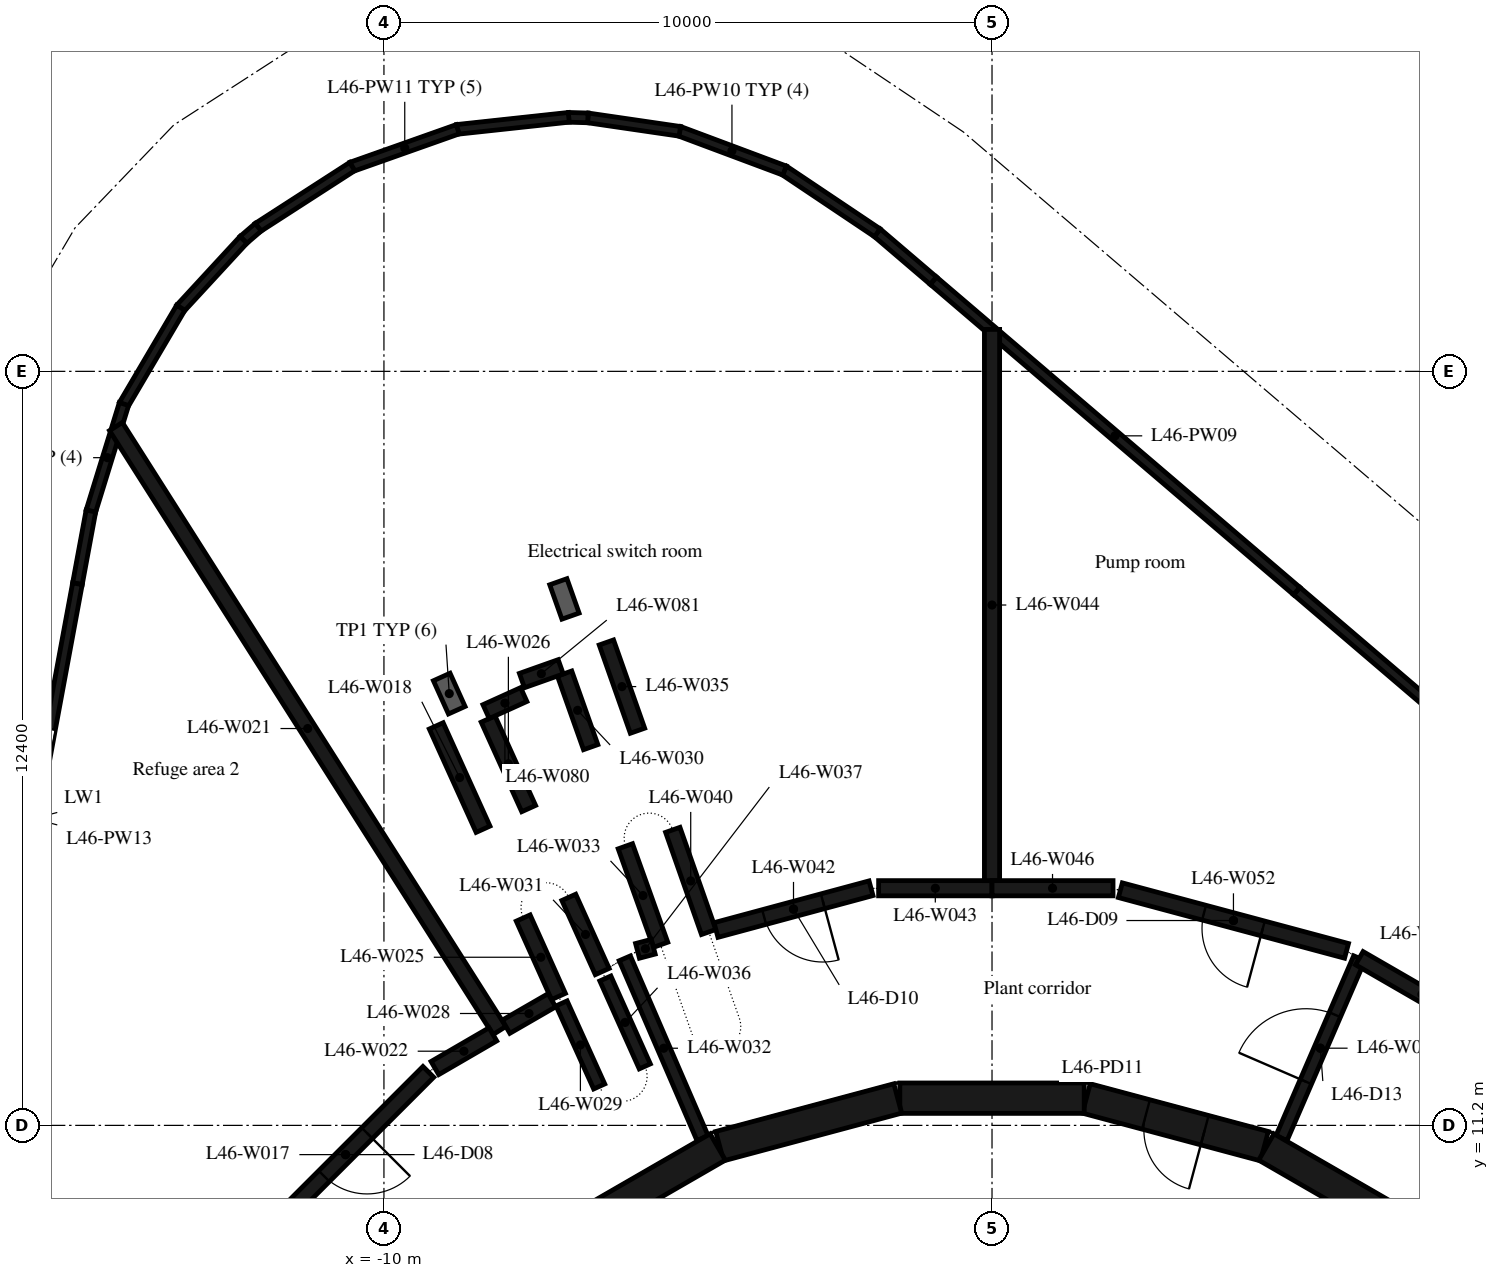
"""IFC4 building model, lengths in metres.
Left out: names, types, materials, properties, quantities, classifications, styles, units other than length and angle.
Written with IfcOpenShell. Run it as: python <this file> out.ifc"""

import sys

from ifc_helpers import new_model, si_unit, direction, frame, frame_2d, origin, place, context, subcontext, project, spatial, rectangle, extrude, element, fill, save


model = new_model("IFC4")
c1 = context("Model", 3, precision=1e-05, world=origin(), true_north=direction((0.0, 1.0)))
c2 = subcontext(c1, "Body", "Model", "MODEL_VIEW")
j1 = project(units=[si_unit("LENGTHUNIT", "METRE"), si_unit("PLANEANGLEUNIT", "RADIAN")], contexts=[c1])
p1 = place(None, origin())
s1 = spatial("IfcSite", under=j1, at=p1, CompositionType="ELEMENT")
p2 = place(p1, origin())
s2 = spatial("IfcBuilding", under=s1, at=p2, CompositionType="ELEMENT")
p3 = place(p2, frame((0.0, 0.0, 183.2)))
s3 = spatial("IfcBuildingStorey", under=s2, at=p3, CompositionType="ELEMENT", Elevation=183.2)
for number, where, z_axis, x_axis in (
    (1, (10.988, 14.883, 0.0), (0.0, 0.0, 1.0), (-0.76, 0.649, 0.0)),
    (2, (5.011, 19.987, 0.0), (0.0, 0.0, 1.0), (-0.76, 0.649, 0.0)),
):
    element("IfcWall", number, at=place(p3, frame(where, z_axis=z_axis, x_axis=x_axis)), inside=s3, PredefinedType="STANDARD", context=c2, shape_type="SweptSolid", body=[
        extrude(rectangle(XDim=7.86, YDim=0.16, at=frame_2d((3.93, 0.0))), origin(), (0.0, 0.0, 1.0), 4.75),
    ])
p4 = place(p3, frame((-0.966, 25.092, 0.0), z_axis=(0.0, 0.0, 1.0), x_axis=(-0.760346823152, 0.649517288856, 0.0)))
e3 = element("IfcWall", 3, at=p4, inside=s3, PredefinedType="STANDARD", context=c2, shape_type="SweptSolid", body=[
    extrude(rectangle(XDim=1.216, YDim=0.16, at=frame_2d((0.608, 0.0))), origin(), (0.0, 0.0, 1.0), 4.75),
])
p5 = place(p3, frame((-1.886, 25.879, 0.0), z_axis=(0.0, 0.0, 1.0), x_axis=(-0.830623160585, 0.556834953195, 0.0)))
e4 = element("IfcWall", 4, at=p5, inside=s3, PredefinedType="STANDARD", context=c2, shape_type="SweptSolid", body=[
    extrude(rectangle(XDim=1.846, YDim=0.16, at=frame_2d((0.923, 0.0))), origin(), (0.0, 0.0, 1.0), 4.75),
])
p6 = place(p3, frame((-3.411, 26.902, 0.0), z_axis=(0.0, 0.0, 1.0), x_axis=(-0.936665358307, 0.350225650899, 0.0)))
e5 = element("IfcWall", 5, at=p6, inside=s3, PredefinedType="STANDARD", context=c2, shape_type="SweptSolid", body=[
    extrude(rectangle(XDim=1.848, YDim=0.16, at=frame_2d((0.924, 0.0))), origin(), (0.0, 0.0, 1.0), 4.75),
])
p7 = place(p3, frame((-5.134, 27.547, 0.0), z_axis=(0.0, 0.0, 1.0), x_axis=(-0.989464414306, 0.144776285427, 0.0)))
e6 = element("IfcWall", 6, at=p7, inside=s3, PredefinedType="STANDARD", context=c2, shape_type="SweptSolid", body=[
    extrude(rectangle(XDim=1.528, YDim=0.16, at=frame_2d((0.764, 0.0))), origin(), (0.0, 0.0, 1.0), 4.75),
])
p8 = place(p3, frame((-6.646, 27.768, 0.0), z_axis=(0.0, 0.0, 1.0), x_axis=(-0.999601368957, 0.028233015764, 0.0)))
e7 = element("IfcWall", 7, at=p8, inside=s3, PredefinedType="STANDARD", context=c2, shape_type="SweptSolid", body=[
    extrude(rectangle(XDim=0.32, YDim=0.16, at=frame_2d((0.16, 0.0))), origin(), (0.0, 0.0, 1.0), 4.75),
])
p9 = place(p3, frame((-6.96, 27.778, 0.0), z_axis=(0.0, 0.0, 1.0), x_axis=(-0.994203609692, -0.107513638558, 0.0)))
e8 = element("IfcWall", 8, at=p9, inside=s3, PredefinedType="STANDARD", context=c2, shape_type="SweptSolid", body=[
    extrude(rectangle(XDim=1.846, YDim=0.16, at=frame_2d((0.923, 0.0))), origin(), (0.0, 0.0, 1.0), 4.75),
])
p10 = place(p3, frame((-8.787, 27.581, 0.0), z_axis=(0.0, 0.0, 1.0), x_axis=(-0.942641080988, -0.333808017329, 0.0)))
e9 = element("IfcWall", 9, at=p10, inside=s3, PredefinedType="STANDARD", context=c2, shape_type="SweptSolid", body=[
    extrude(rectangle(XDim=1.848, YDim=0.16, at=frame_2d((0.924, 0.0))), origin(), (0.0, 0.0, 1.0), 4.75),
])
p11 = place(p3, frame((-10.521, 26.969, 0.0), z_axis=(0.0, 0.0, 1.0), x_axis=(-0.840236412117, -0.542220224404, 0.0)))
e10 = element("IfcWall", 10, at=p11, inside=s3, PredefinedType="STANDARD", context=c2, shape_type="SweptSolid", body=[
    extrude(rectangle(XDim=1.846, YDim=0.16, at=frame_2d((0.923, 0.0))), origin(), (0.0, 0.0, 1.0), 4.75),
])
p12 = place(p3, frame((-12.068, 25.971, 0.0), z_axis=(0.0, 0.0, 1.0), x_axis=(-0.758501989584, -0.651670723446, 0.0)))
e11 = element("IfcWall", 11, at=p12, inside=s3, PredefinedType="STANDARD", context=c2, shape_type="SweptSolid", body=[
    extrude(rectangle(XDim=0.32, YDim=0.16, at=frame_2d((0.16, 0.0))), origin(), (0.0, 0.0, 1.0), 4.75),
])
p13 = place(p3, frame((-12.31, 25.762, 0.0), z_axis=(0.0, 0.0, 1.0), x_axis=(-0.678007946149, -0.735054572776, 0.0)))
e12 = element("IfcWall", 12, at=p13, inside=s3, PredefinedType="STANDARD", context=c2, shape_type="SweptSolid", body=[
    extrude(rectangle(XDim=1.528, YDim=0.16, at=frame_2d((0.764, 0.0))), origin(), (0.0, 0.0, 1.0), 4.75),
])
p14 = place(p3, frame((-13.341, 24.646, 0.0), z_axis=(0.0, 0.0, 1.0), x_axis=(-0.50746464076, -0.861672581889, 0.0)))
e13 = element("IfcWall", 13, at=p14, inside=s3, PredefinedType="STANDARD", context=c2, shape_type="SweptSolid", body=[
    extrude(rectangle(XDim=1.848, YDim=0.16, at=frame_2d((0.924, 0.0))), origin(), (0.0, 0.0, 1.0), 4.75),
])
p15 = place(p3, frame((-14.275, 23.062, 0.0), z_axis=(0.0, 0.0, 1.0), x_axis=(-0.295200909257, -0.955435200929, 0.0)))
e14 = element("IfcWall", 14, at=p15, inside=s3, PredefinedType="STANDARD", context=c2, shape_type="SweptSolid", body=[
    extrude(rectangle(XDim=1.846, YDim=0.16, at=frame_2d((0.923, 0.0))), origin(), (0.0, 0.0, 1.0), 4.75),
])
p16 = place(p3, frame((-14.819, 21.303, 0.0), z_axis=(0.0, 0.0, 1.0), x_axis=(-0.182153983932, -0.983270016902, 0.0)))
e15 = element("IfcWall", 15, at=p16, inside=s3, PredefinedType="STANDARD", context=c2, shape_type="SweptSolid", body=[
    extrude(rectangle(XDim=1.216, YDim=0.16, at=frame_2d((0.608, 0.0))), origin(), (0.0, 0.0, 1.0), 4.75),
])
p17 = place(p3, frame((-15.041, 20.108, 0.0), z_axis=(0.0, 0.0, 1.0), x_axis=(-0.182238304251, -0.983254392547, 0.0)))
e16 = element("IfcWall", 16, at=p17, inside=s3, PredefinedType="STANDARD", context=c2, shape_type="SweptSolid", body=[
    extrude(rectangle(XDim=7.86, YDim=0.16, at=frame_2d((3.93, 0.0))), origin(), (0.0, 0.0, 1.0), 4.75),
])
p18 = place(p17, frame((2.43, 0.0, 1.0)))
e17 = element("IfcOpeningElement", 17, at=p18, cuts=e16, PredefinedType="OPENING", context=c2, shape_type="SweptSolid", body=[
    extrude(rectangle(XDim=3.0, YDim=2.2, at=frame_2d((1.5, 1.1))), frame((0.0, 0.09, 0.0), z_axis=(0.0, -1.0, 0.0), x_axis=(1.0, 0.0, 0.0)), (0.0, 0.0, 1.0), 0.18),
])
p19 = place(p3, frame((7.137, 9.329, 0.0), z_axis=(0.0, 0.0, 1.0), x_axis=(-0.865975092491, 0.500087131594, 0.0)))
e18 = element("IfcWall", 18, at=p19, inside=s3, PredefinedType="SHEAR", context=c2, shape_type="SweptSolid", body=[
    extrude(rectangle(XDim=3.033, YDim=0.5, at=frame_2d((1.516, 0.0))), origin(), (0.0, 0.0, 1.0), 4.75),
])
p20 = place(p3, frame((4.479, 10.858, 0.0), z_axis=(0.0, 0.0, 1.0), x_axis=(-0.965948410781, 0.258734743916, 0.0)))
e19 = element("IfcWall", 19, at=p20, inside=s3, PredefinedType="SHEAR", context=c2, shape_type="SweptSolid", body=[
    extrude(rectangle(XDim=3.033, YDim=0.5, at=frame_2d((1.516, 0.0))), origin(), (0.0, 0.0, 1.0), 4.75),
])
p21 = place(p20, frame((1.016, 0.0, 0.0)))
e20 = element("IfcOpeningElement", 20, at=p21, cuts=e19, PredefinedType="OPENING", context=c2, shape_type="SweptSolid", body=[
    extrude(rectangle(XDim=1.0, YDim=2.4, at=frame_2d((0.5, 1.2))), frame((0.0, 0.26, 0.0), z_axis=(0.0, -1.0, 0.0), x_axis=(1.0, 0.0, 0.0)), (0.0, 0.0, 1.0), 0.52),
])
for number, where, z_axis, x_axis in (
    (21, (1.516, 11.647, 0.0), (0.0, 0.0, 1.0), (-1.0, 0.0, 0.0)),
    (22, (-1.55, 11.643, 0.0), (0.0, 0.0, 1.0), (-0.966, -0.259, 0.0)),
    (23, (-4.51, 10.845, 0.0), (0.0, 0.0, 1.0), (-0.866, -0.5, 0.0)),
):
    element("IfcWall", number, at=place(p3, frame(where, z_axis=z_axis, x_axis=x_axis)), inside=s3, PredefinedType="SHEAR", context=c2, shape_type="SweptSolid", body=[
        extrude(rectangle(XDim=3.033, YDim=0.5, at=frame_2d((1.516, 0.0))), origin(), (0.0, 0.0, 1.0), 4.75),
    ])
p22 = place(p3, frame((-9.27, 12.08, 0.0), z_axis=(0.0, 0.0, 1.0), x_axis=(-0.707106781187, -0.707106781187, 0.0)))
e24 = element("IfcWall", 24, at=p22, inside=s3, PredefinedType="PARTITIONING", context=c2, shape_type="SweptSolid", body=[
    extrude(rectangle(XDim=3.849, YDim=0.25, at=frame_2d((1.925, 0.0))), origin(), (0.0, 0.0, 1.0), 4.75),
])
p23 = place(p22, frame((1.425, 0.0, 0.0)))
e25 = element("IfcOpeningElement", 25, at=p23, cuts=e24, PredefinedType="OPENING", context=c2, shape_type="SweptSolid", body=[
    extrude(rectangle(XDim=1.0, YDim=2.1, at=frame_2d((0.5, 1.05))), frame((0.0, 0.135, 0.0), z_axis=(0.0, -1.0, 0.0), x_axis=(1.0, 0.0, 0.0)), (0.0, 0.0, 1.0), 0.27),
])
p24 = place(p3, frame((-9.14, 17.77, 0.0), z_axis=(0.0, 0.0, 1.0), x_axis=(0.412501408044, -0.910956962958, 0.0)))
e26 = element("IfcWall", 26, at=p24, inside=s3, PredefinedType="PARTITIONING", context=c2, shape_type="SweptSolid", body=[
    extrude(rectangle(XDim=1.866, YDim=0.25, at=frame_2d((0.933, 0.0))), origin(), (0.0, 0.0, 1.0), 4.75),
])
p25 = place(p3, frame((-8.1, 12.76, 0.0), z_axis=(0.0, 0.0, 1.0), x_axis=(-0.536060247706, 0.844179726616, 0.0)))
e27 = element("IfcWall", 27, at=p25, inside=s3, PredefinedType="PARTITIONING", context=c2, shape_type="SweptSolid", body=[
    extrude(rectangle(XDim=11.766, YDim=0.25, at=frame_2d((5.883, 0.0))), origin(), (0.0, 0.0, 1.0), 4.75),
])
p26 = place(p3, frame((-8.208, 12.697, 0.0), z_axis=(0.0, 0.0, 1.0), x_axis=(-0.86455637663, -0.502535841138, 0.0)))
e28 = element("IfcWall", 28, at=p26, inside=s3, PredefinedType="PARTITIONING", context=c2, shape_type="SweptSolid", body=[
    extrude(rectangle(XDim=1.103, YDim=0.25, at=frame_2d((0.552, 0.0))), origin(), (0.0, 0.0, 1.0), 4.75),
])
p27 = place(p3, frame((-7.71, 14.61, 0.0), z_axis=(0.0, 0.0, 1.0), x_axis=(0.410106293635, -0.912037733825, 0.0)))
e29 = element("IfcWall", 29, at=p27, inside=s3, PredefinedType="PARTITIONING", context=c2, shape_type="SweptSolid", body=[
    extrude(rectangle(XDim=1.415, YDim=0.25, at=frame_2d((0.707, 0.0))), origin(), (0.0, 0.0, 1.0), 4.75),
])
p28 = place(p3, frame((-7.62, 16.41, 0.0), z_axis=(0.0, 0.0, 1.0), x_axis=(-0.412505188341, 0.910955251147, 0.0)))
e30 = element("IfcWall", 30, at=p28, inside=s3, PredefinedType="PARTITIONING", context=c2, shape_type="SweptSolid", body=[
    extrude(rectangle(XDim=1.616, YDim=0.25, at=frame_2d((0.808, 0.0))), origin(), (0.0, 0.0, 1.0), 4.75),
])
p29 = place(p3, frame((-7.238, 13.258, 0.0), z_axis=(0.0, 0.0, 1.0), x_axis=(-0.865989304205, -0.500062521093, 0.0)))
e31 = element("IfcWall", 31, at=p29, inside=s3, PredefinedType="PARTITIONING", context=c2, shape_type="SweptSolid", body=[
    extrude(rectangle(XDim=0.87, YDim=0.25, at=frame_2d((0.435, 0.0))), origin(), (0.0, 0.0, 1.0), 4.75),
])
p30 = place(p3, frame((-7.078, 13.206, 0.0), z_axis=(0.0, 0.0, 1.0), x_axis=(0.412428521681, -0.910989963997, 0.0)))
e32 = element("IfcWall", 32, at=p30, inside=s3, PredefinedType="PARTITIONING", context=c2, shape_type="SweptSolid", body=[
    extrude(rectangle(XDim=1.5, YDim=0.2, at=frame_2d((0.75, 0.0))), origin(), (0.0, 0.0, 1.0), 4.75),
])
p31 = place(p3, frame((-7.029, 18.631, 0.0), z_axis=(0.0, 0.0, 1.0), x_axis=(0.333903428613, -0.942607288514, 0.0)))
e33 = element("IfcWall", 33, at=p31, inside=s3, PredefinedType="PARTITIONING", context=c2, shape_type="SweptSolid", body=[
    extrude(rectangle(XDim=1.285, YDim=0.25, at=frame_2d((0.642, 0.0))), origin(), (0.0, 0.0, 1.0), 4.75),
])
p32 = place(p3, frame((-6.41, 13.73, 0.0), z_axis=(0.0, 0.0, 1.0), x_axis=(-0.411024519378, 0.911624289096, 0.0)))
e34 = element("IfcWall", 34, at=p32, inside=s3, PredefinedType="PARTITIONING", context=c2, shape_type="SweptSolid", body=[
    extrude(rectangle(XDim=1.338, YDim=0.25, at=frame_2d((0.669, 0.0))), origin(), (0.0, 0.0, 1.0), 4.75),
])
p33 = place(p3, frame((-6.039, 13.948, 0.0), z_axis=(0.0, 0.0, 1.0), x_axis=(0.396880096663, -0.917870464103, 0.0)))
e35 = element("IfcWall", 35, at=p33, inside=s3, PredefinedType="PARTITIONING", context=c2, shape_type="SweptSolid", body=[
    extrude(rectangle(XDim=3.222, YDim=0.2, at=frame_2d((1.611, 0.0))), origin(), (0.0, 0.0, 1.0), 4.75),
])
p34 = place(p3, frame((-6.03, 15.79, 0.0), z_axis=(0.0, 0.0, 1.0), x_axis=(0.337091235246, -0.941471985308, 0.0)))
e36 = element("IfcWall", 36, at=p34, inside=s3, PredefinedType="PARTITIONING", context=c2, shape_type="SweptSolid", body=[
    extrude(rectangle(XDim=1.721, YDim=0.25, at=frame_2d((0.86, 0.0))), origin(), (0.0, 0.0, 1.0), 4.75),
])
p35 = place(p3, frame((-5.83, 17.69, 0.0), z_axis=(0.0, 0.0, 1.0), x_axis=(-0.332455036473, 0.94311910633, 0.0)))
e37 = element("IfcWall", 37, at=p35, inside=s3, PredefinedType="PARTITIONING", context=c2, shape_type="SweptSolid", body=[
    extrude(rectangle(XDim=1.539, YDim=0.25, at=frame_2d((0.77, 0.0))), origin(), (0.0, 0.0, 1.0), 4.75),
])
p36 = place(p3, frame((-5.71, 12.17, 0.0), z_axis=(0.0, 0.0, 1.0), x_axis=(-0.40942296047, 0.912344693326, 0.0)))
e38 = element("IfcWall", 38, at=p36, inside=s3, PredefinedType="PARTITIONING", context=c2, shape_type="SweptSolid", body=[
    extrude(rectangle(XDim=1.585, YDim=0.2, at=frame_2d((0.792, 0.0))), origin(), (0.0, 0.0, 1.0), 4.75),
])
p37 = place(p3, frame((-5.571, 14.138, 0.0), z_axis=(0.0, 0.0, 1.0), x_axis=(-0.967180624685, -0.254089825129, 0.0)))
e39 = element("IfcWall", 39, at=p37, inside=s3, PredefinedType="PARTITIONING", context=c2, shape_type="SweptSolid", body=[
    extrude(rectangle(XDim=0.268, YDim=0.25, at=frame_2d((0.134, 0.0))), origin(), (0.0, 0.0, 1.0), 4.75),
])
p38 = place(p3, frame((-4.66, 14.38, 0.0), z_axis=(0.0, 0.0, 1.0), x_axis=(-0.331363959676, 0.943503008065, 0.0)))
e40 = element("IfcWall", 40, at=p38, inside=s3, PredefinedType="PARTITIONING", context=c2, shape_type="SweptSolid", body=[
    extrude(rectangle(XDim=1.781, YDim=0.25, at=frame_2d((0.89, 0.0))), origin(), (0.0, 0.0, 1.0), 4.75),
])
p39 = place(p3, frame((-1.99, 15.1, 0.0), z_axis=(0.0, 0.0, 1.0), x_axis=(-0.965506757826, -0.260377995598, 0.0)))
e41 = element("IfcWall", 41, at=p39, inside=s3, PredefinedType="PARTITIONING", context=c2, shape_type="SweptSolid", body=[
    extrude(rectangle(XDim=2.64, YDim=0.25, at=frame_2d((1.32, 0.0))), origin(), (0.0, 0.0, 1.0), 4.75),
])
p40 = place(p39, frame((0.82, 0.0, 0.0)))
e42 = element("IfcOpeningElement", 42, at=p40, cuts=e41, PredefinedType="OPENING", context=c2, shape_type="SweptSolid", body=[
    extrude(rectangle(XDim=1.0, YDim=2.1, at=frame_2d((0.5, 1.05))), frame((0.0, 0.135, 0.0), z_axis=(0.0, -1.0, 0.0), x_axis=(1.0, 0.0, 0.0)), (0.0, 0.0, 1.0), 0.27),
])
p41 = place(p3, frame((0.0, 15.1, 0.0), z_axis=(0.0, 0.0, 1.0), x_axis=(-1.0, 0.0, 0.0)))
e43 = element("IfcWall", 43, at=p41, inside=s3, PredefinedType="PARTITIONING", context=c2, shape_type="SweptSolid", body=[
    extrude(rectangle(XDim=1.865, YDim=0.25, at=frame_2d((0.933, 0.0))), origin(), (0.0, 0.0, 1.0), 4.75),
])
p42 = place(p3, frame((0.0, 15.225, 0.0), z_axis=(0.0, 0.0, 1.0), x_axis=(0.0, 1.0, 0.0)))
e44 = element("IfcWall", 44, at=p42, inside=s3, PredefinedType="PARTITIONING", context=c2, shape_type="SweptSolid", body=[
    extrude(rectangle(XDim=9.065, YDim=0.25, at=frame_2d((4.532, 0.0))), origin(), (0.0, 0.0, 1.0), 4.75),
])
p43 = place(p3, frame((1.99, 15.1, 0.0), z_axis=(0.0, 0.0, 1.0), x_axis=(-1.0, 0.0, 0.0)))
e45 = element("IfcWall", 45, at=p43, inside=s3, PredefinedType="PARTITIONING", context=c2, shape_type="SweptSolid", body=[
    extrude(rectangle(XDim=1.99, YDim=0.25, at=frame_2d((0.995, 0.0))), origin(), (0.0, 0.0, 1.0), 4.75),
])
p44 = place(p3, frame((4.76, 10.99, 0.0), z_axis=(0.0, 0.0, 1.0), x_axis=(0.396905977672, 0.917859272922, 0.0)))
e46 = element("IfcWall", 46, at=p44, inside=s3, PredefinedType="PARTITIONING", context=c2, shape_type="SweptSolid", body=[
    extrude(rectangle(XDim=3.224, YDim=0.2, at=frame_2d((1.612, 0.0))), origin(), (0.0, 0.0, 1.0), 4.75),
])
p45 = place(p44, frame((1.012, 0.0, 0.0)))
e47 = element("IfcOpeningElement", 47, at=p45, cuts=e46, PredefinedType="OPENING", context=c2, shape_type="SweptSolid", body=[
    extrude(rectangle(XDim=1.2, YDim=2.1, at=frame_2d((0.6, 1.05))), frame((0.0, 0.11, 0.0), z_axis=(0.0, -1.0, 0.0), x_axis=(1.0, 0.0, 0.0)), (0.0, 0.0, 1.0), 0.22),
])
p46 = place(p3, frame((5.83, 14.07, 0.0), z_axis=(0.0, 0.0, 1.0), x_axis=(-0.965861411942, 0.259059323171, 0.0)))
e48 = element("IfcWall", 48, at=p46, inside=s3, PredefinedType="PARTITIONING", context=c2, shape_type="SweptSolid", body=[
    extrude(rectangle(XDim=3.851, YDim=0.25, at=frame_2d((1.925, 0.0))), origin(), (0.0, 0.0, 1.0), 4.75),
])
p47 = place(p46, frame((1.425, 0.0, 0.0)))
e49 = element("IfcOpeningElement", 49, at=p47, cuts=e48, PredefinedType="OPENING", context=c2, shape_type="SweptSolid", body=[
    extrude(rectangle(XDim=1.0, YDim=2.1, at=frame_2d((0.5, 1.05))), frame((0.0, 0.135, 0.0), z_axis=(0.0, -1.0, 0.0), x_axis=(1.0, 0.0, 0.0)), (0.0, 0.0, 1.0), 0.27),
])
p48 = place(p3, frame((6.04, 13.95, 0.0), z_axis=(0.0, 0.0, 1.0), x_axis=(0.865922362496, -0.500178430292, 0.0)))
e50 = element("IfcWall", 50, at=p48, inside=s3, PredefinedType="PARTITIONING", context=c2, shape_type="SweptSolid", body=[
    extrude(rectangle(XDim=2.379, YDim=0.25, at=frame_2d((1.189, 0.0))), origin(), (0.0, 0.0, 1.0), 4.75),
])
p49 = place(p3, frame((-7.701, 18.285, 0.0), z_axis=(0.0, 0.0, 1.0), x_axis=(-0.910931266963, -0.412558149681, 0.0)))
e51 = element("IfcWall", 51, at=p49, inside=s3, PredefinedType="PARTITIONING", context=c2, shape_type="SweptSolid", body=[
    extrude(rectangle(XDim=0.68, YDim=0.25, at=frame_2d((0.34, 0.0))), origin(), (0.0, 0.0, 1.0), 4.75),
])
p50 = place(p3, frame((-7.093, 18.741, 0.0), z_axis=(0.0, 0.0, 1.0), x_axis=(-0.942636688844, -0.333820420054, 0.0)))
e52 = element("IfcWall", 52, at=p50, inside=s3, PredefinedType="PARTITIONING", context=c2, shape_type="SweptSolid", body=[
    extrude(rectangle(XDim=0.677, YDim=0.25, at=frame_2d((0.338, 0.0))), origin(), (0.0, 0.0, 1.0), 4.75),
])
p51 = place(p21, origin())
e53 = element("IfcDoor", 53, at=p51, inside=s3, OperationType="SINGLE_SWING_LEFT", PredefinedType="DOOR", context=c2, shape_type="SweptSolid", body=[
    extrude(rectangle(XDim=1.0, YDim=2.4, at=frame_2d((0.5, 1.2))), frame((0.0, 0.025, 0.0), z_axis=(0.0, -1.0, 0.0), x_axis=(1.0, 0.0, 0.0)), (0.0, 0.0, 1.0), 0.05),
])
fill(e20, e53)
p52 = place(p23, origin())
e54 = element("IfcDoor", 54, at=p52, inside=s3, OperationType="SINGLE_SWING_LEFT", PredefinedType="DOOR", context=c2, shape_type="SweptSolid", body=[
    extrude(rectangle(XDim=1.0, YDim=2.1, at=frame_2d((0.5, 1.05))), frame((0.0, 0.025, 0.0), z_axis=(0.0, -1.0, 0.0), x_axis=(1.0, 0.0, 0.0)), (0.0, 0.0, 1.0), 0.05),
])
fill(e25, e54)
p53 = place(p47, origin())
e55 = element("IfcDoor", 55, at=p53, inside=s3, OperationType="SINGLE_SWING_LEFT", PredefinedType="DOOR", context=c2, shape_type="SweptSolid", body=[
    extrude(rectangle(XDim=1.0, YDim=2.1, at=frame_2d((0.5, 1.05))), frame((0.0, 0.025, 0.0), z_axis=(0.0, -1.0, 0.0), x_axis=(1.0, 0.0, 0.0)), (0.0, 0.0, 1.0), 0.05),
])
fill(e49, e55)
p54 = place(p40, origin())
e56 = element("IfcDoor", 56, at=p54, inside=s3, OperationType="SINGLE_SWING_LEFT", PredefinedType="DOOR", context=c2, shape_type="SweptSolid", body=[
    extrude(rectangle(XDim=1.0, YDim=2.1, at=frame_2d((0.5, 1.05))), frame((0.0, 0.025, 0.0), z_axis=(0.0, -1.0, 0.0), x_axis=(1.0, 0.0, 0.0)), (0.0, 0.0, 1.0), 0.05),
])
fill(e42, e56)
p55 = place(p45, origin())
e57 = element("IfcDoor", 57, at=p55, inside=s3, OperationType="SINGLE_SWING_LEFT", PredefinedType="DOOR", context=c2, shape_type="SweptSolid", body=[
    extrude(rectangle(XDim=1.2, YDim=2.1, at=frame_2d((0.6, 1.05))), frame((0.0, 0.025, 0.0), z_axis=(0.0, -1.0, 0.0), x_axis=(1.0, 0.0, 0.0)), (0.0, 0.0, 1.0), 0.05),
])
fill(e47, e57)
save(model, sys.argv[1])
